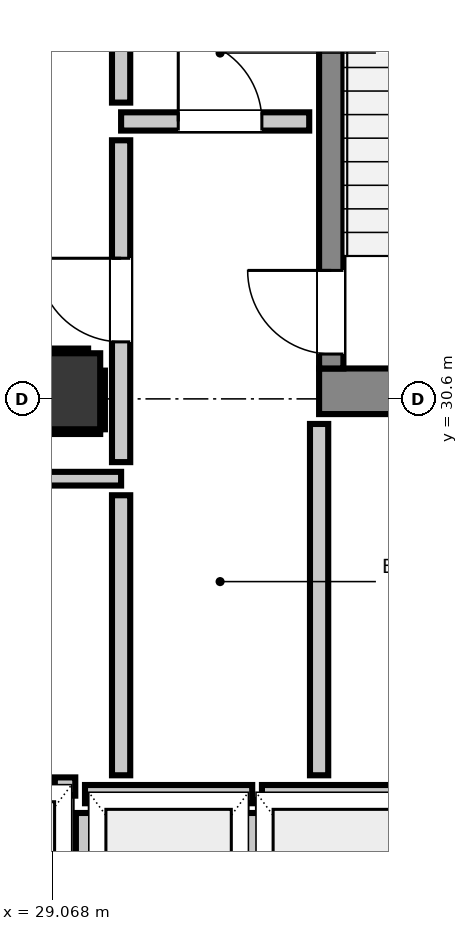
"""IFC4 building model, lengths in metres.
Left out: names, types, materials, properties, quantities, classifications, styles, units other than length and angle.
Written with IfcOpenShell. Run it as: python <this file> out.ifc"""

import sys

from ifc_helpers import new_model, si_unit, direction, frame, frame_2d, origin, origin_2d, place, context, subcontext, project, spatial, rectangle, extrude, element, fill, save


model = new_model("IFC4")
c1 = context("Model", 3, precision=1e-05, world=origin(), true_north=direction((0.0, 1.0)))
c2 = subcontext(c1, "Body", "Model", "MODEL_VIEW")
j1 = project(units=[si_unit("LENGTHUNIT", "METRE"), si_unit("PLANEANGLEUNIT", "RADIAN")], contexts=[c1])
p1 = place(None, origin())
s1 = spatial("IfcSite", under=j1, at=p1, CompositionType="ELEMENT")
p2 = place(p1, origin())
s2 = spatial("IfcBuilding", under=s1, at=p2, CompositionType="ELEMENT")
p3 = place(p2, frame((0.0, 0.0, 88.4)))
s3 = spatial("IfcBuildingStorey", under=s2, at=p3, CompositionType="ELEMENT", Elevation=88.4)
p4 = place(p3, frame((32.58, 30.7, 0.0), z_axis=(0.0, 0.0, 1.0), x_axis=(1.0, 0.0, 0.0)))
e1 = element("IfcWall", 1, at=p4, inside=s3, PredefinedType="SHEAR", context=c2, shape_type="SweptSolid", body=[
    extrude(rectangle(XDim=3.415, YDim=0.6, at=frame_2d((1.708, 0.0))), origin(), (0.0, 0.0, 1.0), 4.4),
])
p5 = place(p3, frame((32.74, 31.0, 0.0), z_axis=(0.0, 0.0, 1.0), x_axis=(0.0, 1.0, 0.0)))
e2 = element("IfcWall", 2, at=p5, inside=s3, PredefinedType="SHEAR", context=c2, shape_type="SweptSolid", body=[
    extrude(rectangle(XDim=7.8, YDim=0.32, at=frame_2d((3.9, 0.0))), origin(), (0.0, 0.0, 1.0), 4.4),
])
p6 = place(p5, frame((0.19, 0.0, 0.0)))
e3 = element("IfcOpeningElement", 3, at=p6, cuts=e2, PredefinedType="OPENING", context=c2, shape_type="SweptSolid", body=[
    extrude(rectangle(XDim=1.1, YDim=2.15, at=frame_2d((0.55, 1.075))), frame((0.0, 0.17, 0.0), z_axis=(0.0, -1.0, 0.0), x_axis=(1.0, 0.0, 0.0)), (0.0, 0.0, 1.0), 0.34),
])
p7 = place(p3, frame((29.2, 30.7, 0.0), z_axis=(0.0, 0.0, 1.0), x_axis=(1.0, 0.0, 0.0)))
e4 = element("IfcColumn", 4, at=p7, inside=s3, PredefinedType="COLUMN", context=c2, shape_type="SweptSolid", body=[
    extrude(rectangle(XDim=1.0, YDim=1.0, at=origin_2d()), origin(), (0.0, 0.0, 1.0), 4.4),
])
p8 = place(p3, frame((29.5, 25.4, 0.0), z_axis=(0.0, 0.0, 1.0), x_axis=(1.0, 0.0, 0.0)))
e5 = element("IfcWall", 5, at=p8, inside=s3, PredefinedType="PARTITIONING", context=c2, shape_type="SweptSolid", body=[
    extrude(rectangle(XDim=2.2, YDim=0.24, at=frame_2d((1.1, 0.0))), origin(), (0.0, 0.0, 1.0), 4.14),
])
p9 = place(p3, frame((29.5, 22.632, 0.0), z_axis=(0.0, 0.0, 1.0), x_axis=(0.0, 1.0, 0.0)))
e6 = element("IfcWall", 6, at=p9, inside=s3, PredefinedType="PARTITIONING", context=c2, shape_type="SweptSolid", body=[
    extrude(rectangle(XDim=2.52, YDim=0.24, at=frame_2d((1.26, 0.0))), origin(), (0.0, 0.0, 1.0), 3.375),
])
p10 = place(p3, frame((31.7, 22.63, 0.0), z_axis=(0.0, 0.0, 1.0), x_axis=(0.0, 1.0, 0.0)))
e7 = element("IfcWall", 7, at=p10, inside=s3, PredefinedType="PARTITIONING", context=c2, shape_type="SweptSolid", body=[
    extrude(rectangle(XDim=2.522, YDim=0.24, at=frame_2d((1.261, 0.0))), origin(), (0.0, 0.0, 1.0), 4.14),
])
p11 = place(p3, frame((31.828, 25.4, 0.0), z_axis=(0.0, 0.0, 1.0), x_axis=(1.0, 0.0, 0.0)))
e8 = element("IfcWall", 8, at=p11, inside=s3, PredefinedType="PARTITIONING", context=c2, shape_type="SweptSolid", body=[
    extrude(rectangle(XDim=2.072, YDim=0.24, at=frame_2d((1.036, 0.0))), origin(), (0.0, 0.0, 1.0), 4.14),
])
p12 = place(p3, frame((29.103, 25.5, 0.0), z_axis=(0.0, 0.0, 1.0), x_axis=(1.0, 0.0, 0.0)))
e9 = element("IfcWall", 9, at=p12, inside=s3, PredefinedType="PARTITIONING", context=c2, shape_type="SweptSolid", body=[
    extrude(rectangle(XDim=0.269, YDim=0.24, at=frame_2d((0.135, 0.0))), origin(), (0.0, 0.0, 1.0), 4.14),
])
p13 = place(p3, frame((29.975, 34.25, 0.0), z_axis=(0.0, 0.0, 1.0), x_axis=(1.0, 0.0, 0.0)))
e10 = element("IfcWall", 10, at=p13, inside=s3, PredefinedType="PARTITIONING", context=c2, shape_type="SweptSolid", body=[
    extrude(rectangle(XDim=2.475, YDim=0.24, at=frame_2d((1.237, 0.0))), origin(), (0.0, 0.0, 1.0), 4.14),
])
p14 = place(p13, frame((0.752, 0.0, 0.0)))
e11 = element("IfcOpeningElement", 11, at=p14, cuts=e10, PredefinedType="OPENING", context=c2, shape_type="SweptSolid", body=[
    extrude(rectangle(XDim=1.1, YDim=2.15, at=frame_2d((0.55, 1.075))), frame((0.0, 0.13, 0.0), z_axis=(0.0, -1.0, 0.0), x_axis=(1.0, 0.0, 0.0)), (0.0, 0.0, 1.0), 0.26),
])
p15 = place(p3, frame((20.65, 29.55, 0.0), z_axis=(0.0, 0.0, 1.0), x_axis=(1.0, 0.0, 0.0)))
e12 = element("IfcWall", 12, at=p15, inside=s3, PredefinedType="PARTITIONING", context=c2, shape_type="SweptSolid", body=[
    extrude(rectangle(XDim=9.325, YDim=0.18, at=frame_2d((4.663, 0.0))), origin(), (0.0, 0.0, 1.0), 4.14),
])
p16 = place(p3, frame((29.975, 25.648, 0.0), z_axis=(0.0, 0.0, 1.0), x_axis=(0.0, 1.0, 0.0)))
e13 = element("IfcWall", 13, at=p16, inside=s3, PredefinedType="PARTITIONING", context=c2, shape_type="SweptSolid", body=[
    extrude(rectangle(XDim=3.684, YDim=0.24, at=frame_2d((1.842, 0.0))), origin(), (0.0, 0.0, 1.0), 4.14),
])
p17 = place(p3, frame((29.975, 29.768, 0.0), z_axis=(0.0, 0.0, 1.0), x_axis=(0.0, 1.0, 0.0)))
e14 = element("IfcWall", 14, at=p17, inside=s3, PredefinedType="PARTITIONING", context=c2, shape_type="SweptSolid", body=[
    extrude(rectangle(XDim=4.234, YDim=0.24, at=frame_2d((2.117, 0.0))), origin(), (0.0, 0.0, 1.0), 4.14),
])
p18 = place(p17, frame((1.582, 0.0, 0.0)))
e15 = element("IfcOpeningElement", 15, at=p18, cuts=e14, PredefinedType="OPENING", context=c2, shape_type="SweptSolid", body=[
    extrude(rectangle(XDim=1.1, YDim=2.15, at=frame_2d((0.55, 1.075))), frame((0.0, 0.13, 0.0), z_axis=(0.0, -1.0, 0.0), x_axis=(1.0, 0.0, 0.0)), (0.0, 0.0, 1.0), 0.26),
])
p19 = place(p3, frame((29.975, 34.498, 0.0), z_axis=(0.0, 0.0, 1.0), x_axis=(0.0, 1.0, 0.0)))
e16 = element("IfcWall", 16, at=p19, inside=s3, PredefinedType="PARTITIONING", context=c2, shape_type="SweptSolid", body=[
    extrude(rectangle(XDim=0.924, YDim=0.24, at=frame_2d((0.462, 0.0))), origin(), (0.0, 0.0, 1.0), 4.14),
])
p20 = place(p3, frame((32.58, 25.648, 0.0), z_axis=(0.0, 0.0, 1.0), x_axis=(0.0, 1.0, 0.0)))
e17 = element("IfcWall", 17, at=p20, inside=s3, PredefinedType="PARTITIONING", context=c2, shape_type="SweptSolid", body=[
    extrude(rectangle(XDim=4.622, YDim=0.24, at=frame_2d((2.311, 0.0))), origin(), (0.0, 0.0, 1.0), 4.14),
])
p21 = place(p3, frame((28.7, 30.168, 0.0), z_axis=(0.0, 0.0, 1.0), x_axis=(1.0, 0.0, 0.0)))
e18 = element("IfcWall", 18, at=p21, inside=s3, PredefinedType="PARTITIONING", context=c2, shape_type="SweptSolid", body=[
    extrude(rectangle(XDim=1.0, YDim=0.06, at=frame_2d((0.5, 0.0))), origin(), (0.0, 0.0, 1.0), 1.45),
])
p22 = place(p3, frame((28.7, 31.232, 0.0), z_axis=(0.0, 0.0, 1.0), x_axis=(1.0, 0.0, 0.0)))
e19 = element("IfcWall", 19, at=p22, inside=s3, PredefinedType="PARTITIONING", context=c2, shape_type="SweptSolid", body=[
    extrude(rectangle(XDim=0.841, YDim=0.06, at=frame_2d((0.42, 0.0))), origin(), (0.0, 0.0, 1.0), 1.45),
])
p23 = place(p3, frame((29.732, 30.2, 0.0), z_axis=(0.0, 0.0, 1.0), x_axis=(0.0, 1.0, 0.0)))
e20 = element("IfcWall", 20, at=p23, inside=s3, PredefinedType="PARTITIONING", context=c2, shape_type="SweptSolid", body=[
    extrude(rectangle(XDim=0.772, YDim=0.06, at=frame_2d((0.386, 0.0))), origin(), (0.0, 0.0, 1.0), 1.45),
])
p24 = place(p6, origin())
e21 = element("IfcDoor", 21, at=p24, inside=s3, OperationType="SINGLE_SWING_RIGHT", PredefinedType="DOOR", context=c2, shape_type="SweptSolid", body=[
    extrude(rectangle(XDim=1.1, YDim=2.15, at=frame_2d((0.55, 1.075))), frame((0.0, 0.025, 0.0), z_axis=(0.0, -1.0, 0.0), x_axis=(1.0, 0.0, 0.0)), (0.0, 0.0, 1.0), 0.05),
])
fill(e3, e21)
p25 = place(p18, origin())
e22 = element("IfcDoor", 22, at=p25, inside=s3, OperationType="SINGLE_SWING_RIGHT", PredefinedType="DOOR", context=c2, shape_type="SweptSolid", body=[
    extrude(rectangle(XDim=1.1, YDim=2.15, at=frame_2d((0.55, 1.075))), frame((0.0, 0.025, 0.0), z_axis=(0.0, -1.0, 0.0), x_axis=(1.0, 0.0, 0.0)), (0.0, 0.0, 1.0), 0.05),
])
fill(e15, e22)
p26 = place(p14, origin())
e23 = element("IfcDoor", 23, at=p26, inside=s3, OperationType="SINGLE_SWING_LEFT", PredefinedType="DOOR", context=c2, shape_type="SweptSolid", body=[
    extrude(rectangle(XDim=1.1, YDim=2.15, at=frame_2d((0.55, 1.075))), frame((0.0, 0.025, 0.0), z_axis=(0.0, -1.0, 0.0), x_axis=(1.0, 0.0, 0.0)), (0.0, 0.0, 1.0), 0.05),
])
fill(e11, e23)
save(model, sys.argv[1])
